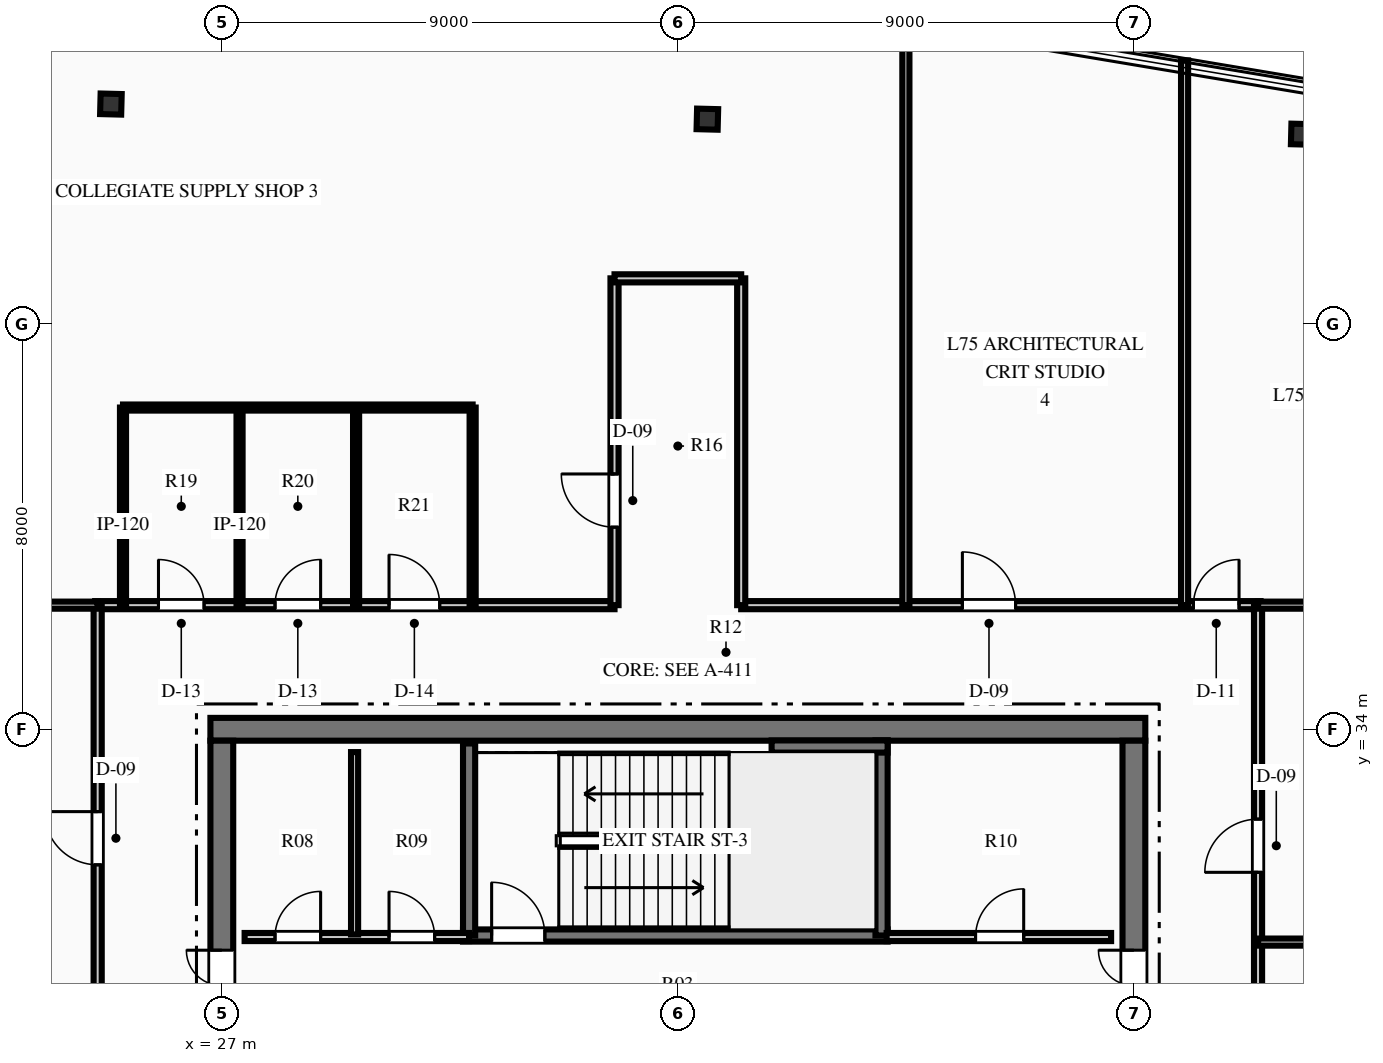
"""IFC4 building model, lengths in metres.
Left out: names, types, materials, properties, quantities, classifications, styles, units other than length and angle.
Written with IfcOpenShell. Run it as: python <this file> out.ifc"""

import sys

from ifc_helpers import new_model, si_unit, direction, frame, frame_2d, origin, origin_2d, place, context, subcontext, project, spatial, rectangle, i_section, extrude, element, fill, save


model = new_model("IFC4")
c1 = context("Model", 3, precision=1e-05, world=origin(), true_north=direction((0.0, 1.0)))
c2 = subcontext(c1, "Body", "Model", "MODEL_VIEW")
j1 = project(units=[si_unit("LENGTHUNIT", "METRE"), si_unit("PLANEANGLEUNIT", "RADIAN")], contexts=[c1])
p1 = place(None, origin())
s1 = spatial("IfcSite", under=j1, at=p1, CompositionType="ELEMENT")
p2 = place(p1, origin())
s2 = spatial("IfcBuilding", under=s1, at=p2, CompositionType="ELEMENT")
p3 = place(p2, frame((0.0, 0.0, 298.2)))
s3 = spatial("IfcBuildingStorey", under=s2, at=p3, CompositionType="ELEMENT", Elevation=298.2)
p4 = place(p3, frame((26.775, 34.0, 0.0), z_axis=(0.0, 0.0, 1.0), x_axis=(1.0, 0.0, 0.0)))
e1 = element("IfcWall", 1, at=p4, inside=s3, PredefinedType="SHEAR", context=c2, shape_type="SweptSolid", body=[
    extrude(rectangle(XDim=18.45, YDim=0.45, at=frame_2d((9.225, 0.0))), origin(), (0.0, 0.0, 1.0), 4.5),
])
p5 = place(p3, frame((27.0, 18.225, 0.0), z_axis=(0.0, 0.0, 1.0), x_axis=(0.0, 1.0, 0.0)))
e2 = element("IfcWall", 2, at=p5, inside=s3, PredefinedType="SHEAR", context=c2, shape_type="SweptSolid", body=[
    extrude(rectangle(XDim=15.55, YDim=0.45, at=frame_2d((7.775, 0.0))), origin(), (0.0, 0.0, 1.0), 4.5),
])
p6 = place(p5, frame((10.015, 0.0, 0.0)))
e3 = element("IfcOpeningElement", 3, at=p6, cuts=e2, PredefinedType="OPENING", context=c2, shape_type="SweptSolid", body=[
    extrude(rectangle(XDim=1.4, YDim=2.2, at=frame_2d((0.7, 1.1))), frame((0.0, 0.235, 0.0), z_axis=(0.0, -1.0, 0.0), x_axis=(1.0, 0.0, 0.0)), (0.0, 0.0, 1.0), 0.47),
])
p7 = place(p3, frame((45.0, 18.225, 0.0), z_axis=(0.0, 0.0, 1.0), x_axis=(0.0, 1.0, 0.0)))
e4 = element("IfcWall", 4, at=p7, inside=s3, PredefinedType="SHEAR", context=c2, shape_type="SweptSolid", body=[
    extrude(rectangle(XDim=15.55, YDim=0.45, at=frame_2d((7.775, 0.0))), origin(), (0.0, 0.0, 1.0), 4.5),
])
p8 = place(p7, frame((10.015, 0.0, 0.0)))
e5 = element("IfcOpeningElement", 5, at=p8, cuts=e4, PredefinedType="OPENING", context=c2, shape_type="SweptSolid", body=[
    extrude(rectangle(XDim=1.4, YDim=2.2, at=frame_2d((0.7, 1.1))), frame((0.0, 0.235, 0.0), z_axis=(0.0, -1.0, 0.0), x_axis=(1.0, 0.0, 0.0)), (0.0, 0.0, 1.0), 0.47),
])
p9 = place(p3, frame((31.76, 29.93, 0.0), z_axis=(0.0, 0.0, 1.0), x_axis=(1.0, 0.0, 0.0)))
e6 = element("IfcWall", 6, at=p9, inside=s3, PredefinedType="SHEAR", context=c2, shape_type="SweptSolid", body=[
    extrude(rectangle(XDim=8.38, YDim=0.24, at=frame_2d((4.19, 0.0))), origin(), (0.0, 0.0, 1.0), 4.5),
])
p10 = place(p9, frame((0.565, 0.0, 0.0)))
e7 = element("IfcOpeningElement", 7, at=p10, cuts=e6, PredefinedType="OPENING", context=c2, shape_type="SweptSolid", body=[
    extrude(rectangle(XDim=1.05, YDim=2.15, at=frame_2d((0.525, 1.075))), frame((0.0, 0.13, 0.0), z_axis=(0.0, -1.0, 0.0), x_axis=(1.0, 0.0, 0.0)), (0.0, 0.0, 1.0), 0.26),
])
p11 = place(p3, frame((31.88, 29.93, 0.0), z_axis=(0.0, 0.0, 1.0), x_axis=(0.0, 1.0, 0.0)))
e8 = element("IfcWall", 8, at=p11, inside=s3, PredefinedType="SHEAR", context=c2, shape_type="SweptSolid", body=[
    extrude(rectangle(XDim=3.79, YDim=0.24, at=frame_2d((1.895, 0.0))), origin(), (0.0, 0.0, 1.0), 4.5),
])
p12 = place(p3, frame((40.02, 29.93, 0.0), z_axis=(0.0, 0.0, 1.0), x_axis=(0.0, 1.0, 0.0)))
e9 = element("IfcWall", 9, at=p12, inside=s3, PredefinedType="SHEAR", context=c2, shape_type="SweptSolid", body=[
    extrude(rectangle(XDim=3.85, YDim=0.24, at=frame_2d((1.925, 0.0))), origin(), (0.0, 0.0, 1.0), 4.5),
])
p13 = place(p3, frame((37.85, 33.66, 0.0), z_axis=(0.0, 0.0, 1.0), x_axis=(1.0, 0.0, 0.0)))
e10 = element("IfcWall", 10, at=p13, inside=s3, PredefinedType="SHEAR", context=c2, shape_type="SweptSolid", body=[
    extrude(rectangle(XDim=2.29, YDim=0.24, at=frame_2d((1.145, 0.0))), origin(), (0.0, 0.0, 1.0), 4.5),
])
for number, where, z_axis, x_axis in (
    (11, (48.312, 45.745, 0.0), (0.0, 0.0, 1.0), (0.025, 1.0, 0.0)),
    (12, (36.582, 46.042, 0.0), (0.0, 0.0, 1.0), (0.025, 1.0, 0.0)),
    (13, (24.811, 46.34, 0.0), (0.0, 0.0, 1.0), (0.025, 1.0, 0.0)),
):
    element("IfcColumn", number, at=place(p3, frame(where, z_axis=z_axis, x_axis=x_axis)), inside=s3, PredefinedType="COLUMN", context=c2, shape_type="SweptSolid", body=[
        extrude(i_section(OverallWidth=0.406, OverallDepth=0.416, WebThickness=0.03, FlangeThickness=0.048, at=origin_2d()), origin(), (0.0, 0.0, 1.0), 4.5),
    ])
p14 = place(p3, frame((27.45, 29.9, 0.0), z_axis=(0.0, 0.0, 1.0), x_axis=(1.0, 0.0, 0.0)))
e14 = element("IfcWall", 14, at=p14, inside=s3, PredefinedType="PARTITIONING", context=c2, shape_type="SweptSolid", body=[
    extrude(rectangle(XDim=4.43, YDim=0.16, at=frame_2d((2.215, 0.0))), origin(), (0.0, 0.0, 1.0), 4.24),
])
p15 = place(p14, frame((0.6, 0.0, 0.0)))
e15 = element("IfcOpeningElement", 15, at=p15, cuts=e14, PredefinedType="OPENING", context=c2, shape_type="SweptSolid", body=[
    extrude(rectangle(XDim=0.9, YDim=2.15, at=frame_2d((0.45, 1.075))), frame((0.0, 0.09, 0.0), z_axis=(0.0, -1.0, 0.0), x_axis=(1.0, 0.0, 0.0)), (0.0, 0.0, 1.0), 0.18),
])
p16 = place(p14, frame((2.85, 0.0, 0.0)))
e16 = element("IfcOpeningElement", 16, at=p16, cuts=e14, PredefinedType="OPENING", context=c2, shape_type="SweptSolid", body=[
    extrude(rectangle(XDim=0.9, YDim=2.15, at=frame_2d((0.45, 1.075))), frame((0.0, 0.09, 0.0), z_axis=(0.0, -1.0, 0.0), x_axis=(1.0, 0.0, 0.0)), (0.0, 0.0, 1.0), 0.18),
])
p17 = place(p3, frame((29.62, 29.95, 0.0), z_axis=(0.0, 0.0, 1.0), x_axis=(0.0, 1.0, 0.0)))
e17 = element("IfcWall", 17, at=p17, inside=s3, PredefinedType="PARTITIONING", context=c2, shape_type="SweptSolid", body=[
    extrude(rectangle(XDim=3.6, YDim=0.14, at=frame_2d((1.8, 0.0))), origin(), (0.0, 0.0, 1.0), 4.24),
])
p18 = place(p3, frame((40.12, 29.9, 0.0), z_axis=(0.0, 0.0, 1.0), x_axis=(1.0, 0.0, 0.0)))
e18 = element("IfcWall", 18, at=p18, inside=s3, PredefinedType="PARTITIONING", context=c2, shape_type="SweptSolid", body=[
    extrude(rectangle(XDim=4.43, YDim=0.16, at=frame_2d((2.215, 0.0))), origin(), (0.0, 0.0, 1.0), 4.24),
])
p19 = place(p18, frame((1.755, 0.0, 0.0)))
e19 = element("IfcOpeningElement", 19, at=p19, cuts=e18, PredefinedType="OPENING", context=c2, shape_type="SweptSolid", body=[
    extrude(rectangle(XDim=0.95, YDim=2.15, at=frame_2d((0.475, 1.075))), frame((0.0, 0.09, 0.0), z_axis=(0.0, -1.0, 0.0), x_axis=(1.0, 0.0, 0.0)), (0.0, 0.0, 1.0), 0.18),
])
p20 = place(p3, frame((24.5, 36.45, 0.0), z_axis=(0.0, 0.0, 1.0), x_axis=(1.0, 0.0, 0.0)))
e20 = element("IfcWall", 20, at=p20, inside=s3, PredefinedType="PARTITIONING", context=c2, shape_type="SweptSolid", body=[
    extrude(rectangle(XDim=10.25, YDim=0.16, at=frame_2d((5.125, 0.0))), origin(), (0.0, 0.0, 1.0), 4.24),
])
p21 = place(p20, frame((1.25, 0.0, 0.0)))
e21 = element("IfcOpeningElement", 21, at=p21, cuts=e20, PredefinedType="OPENING", context=c2, shape_type="SweptSolid", body=[
    extrude(rectangle(XDim=0.9, YDim=2.15, at=frame_2d((0.45, 1.075))), frame((0.0, 0.09, 0.0), z_axis=(0.0, -1.0, 0.0), x_axis=(1.0, 0.0, 0.0)), (0.0, 0.0, 1.0), 0.18),
])
p22 = place(p20, frame((3.55, 0.0, 0.0)))
e22 = element("IfcOpeningElement", 22, at=p22, cuts=e20, PredefinedType="OPENING", context=c2, shape_type="SweptSolid", body=[
    extrude(rectangle(XDim=0.9, YDim=2.15, at=frame_2d((0.45, 1.075))), frame((0.0, 0.09, 0.0), z_axis=(0.0, -1.0, 0.0), x_axis=(1.0, 0.0, 0.0)), (0.0, 0.0, 1.0), 0.18),
])
p23 = place(p20, frame((5.8, 0.0, 0.0)))
e23 = element("IfcOpeningElement", 23, at=p23, cuts=e20, PredefinedType="OPENING", context=c2, shape_type="SweptSolid", body=[
    extrude(rectangle(XDim=1.0, YDim=2.15, at=frame_2d((0.5, 1.075))), frame((0.0, 0.09, 0.0), z_axis=(0.0, -1.0, 0.0), x_axis=(1.0, 0.0, 0.0)), (0.0, 0.0, 1.0), 0.18),
])
p24 = place(p3, frame((37.25, 36.45, 0.0), z_axis=(0.0, 0.0, 1.0), x_axis=(1.0, 0.0, 0.0)))
e24 = element("IfcWall", 24, at=p24, inside=s3, PredefinedType="PARTITIONING", context=c2, shape_type="SweptSolid", body=[
    extrude(rectangle(XDim=10.25, YDim=0.16, at=frame_2d((5.125, 0.0))), origin(), (0.0, 0.0, 1.0), 4.24),
])
p25 = place(p24, frame((4.365, 0.0, 0.0)))
e25 = element("IfcOpeningElement", 25, at=p25, cuts=e24, PredefinedType="OPENING", context=c2, shape_type="SweptSolid", body=[
    extrude(rectangle(XDim=1.05, YDim=2.15, at=frame_2d((0.525, 1.075))), frame((0.0, 0.09, 0.0), z_axis=(0.0, -1.0, 0.0), x_axis=(1.0, 0.0, 0.0)), (0.0, 0.0, 1.0), 0.18),
])
p26 = place(p24, frame((8.925, 0.0, 0.0)))
e26 = element("IfcOpeningElement", 26, at=p26, cuts=e24, PredefinedType="OPENING", context=c2, shape_type="SweptSolid", body=[
    extrude(rectangle(XDim=0.9, YDim=2.15, at=frame_2d((0.45, 1.075))), frame((0.0, 0.09, 0.0), z_axis=(0.0, -1.0, 0.0), x_axis=(1.0, 0.0, 0.0)), (0.0, 0.0, 1.0), 0.18),
])
p27 = place(p3, frame((24.55, 27.25, 0.0), z_axis=(0.0, 0.0, 1.0), x_axis=(0.0, 1.0, 0.0)))
e27 = element("IfcWall", 27, at=p27, inside=s3, PredefinedType="PARTITIONING", context=c2, shape_type="SweptSolid", body=[
    extrude(rectangle(XDim=9.2, YDim=0.16, at=frame_2d((4.6, 0.0))), origin(), (0.0, 0.0, 1.0), 4.24),
])
p28 = place(p27, frame((4.075, 0.0, 0.0)))
e28 = element("IfcOpeningElement", 28, at=p28, cuts=e27, PredefinedType="OPENING", context=c2, shape_type="SweptSolid", body=[
    extrude(rectangle(XDim=1.05, YDim=2.15, at=frame_2d((0.525, 1.075))), frame((0.0, 0.09, 0.0), z_axis=(0.0, -1.0, 0.0), x_axis=(1.0, 0.0, 0.0)), (0.0, 0.0, 1.0), 0.18),
])
p29 = place(p3, frame((47.45, 27.25, 0.0), z_axis=(0.0, 0.0, 1.0), x_axis=(0.0, 1.0, 0.0)))
e29 = element("IfcWall", 29, at=p29, inside=s3, PredefinedType="PARTITIONING", context=c2, shape_type="SweptSolid", body=[
    extrude(rectangle(XDim=9.2, YDim=0.16, at=frame_2d((4.6, 0.0))), origin(), (0.0, 0.0, 1.0), 4.24),
])
p30 = place(p29, frame((3.927, 0.0, 0.0)))
e30 = element("IfcOpeningElement", 30, at=p30, cuts=e29, PredefinedType="OPENING", context=c2, shape_type="SweptSolid", body=[
    extrude(rectangle(XDim=1.05, YDim=2.15, at=frame_2d((0.525, 1.075))), frame((0.0, 0.09, 0.0), z_axis=(0.0, -1.0, 0.0), x_axis=(1.0, 0.0, 0.0)), (0.0, 0.0, 1.0), 0.18),
])
p31 = place(p3, frame((34.75, 36.45, 0.0), z_axis=(0.0, 0.0, 1.0), x_axis=(0.0, 1.0, 0.0)))
e31 = element("IfcWall", 31, at=p31, inside=s3, PredefinedType="PARTITIONING", context=c2, shape_type="SweptSolid", body=[
    extrude(rectangle(XDim=6.45, YDim=0.16, at=frame_2d((3.225, 0.0))), origin(), (0.0, 0.0, 1.0), 4.24),
])
p32 = place(p31, frame((1.539, 0.0, 0.0)))
e32 = element("IfcOpeningElement", 32, at=p32, cuts=e31, PredefinedType="OPENING", context=c2, shape_type="SweptSolid", body=[
    extrude(rectangle(XDim=1.05, YDim=2.15, at=frame_2d((0.525, 1.075))), frame((0.0, 0.09, 0.0), z_axis=(0.0, -1.0, 0.0), x_axis=(1.0, 0.0, 0.0)), (0.0, 0.0, 1.0), 0.18),
])
p33 = place(p3, frame((37.25, 36.45, 0.0), z_axis=(0.0, 0.0, 1.0), x_axis=(0.0, 1.0, 0.0)))
e33 = element("IfcWall", 33, at=p33, inside=s3, PredefinedType="PARTITIONING", context=c2, shape_type="SweptSolid", body=[
    extrude(rectangle(XDim=6.45, YDim=0.16, at=frame_2d((3.225, 0.0))), origin(), (0.0, 0.0, 1.0), 4.24),
])
p34 = place(p3, frame((34.75, 42.9, 0.0), z_axis=(0.0, 0.0, 1.0), x_axis=(1.0, 0.0, 0.0)))
e34 = element("IfcWall", 34, at=p34, inside=s3, PredefinedType="PARTITIONING", context=c2, shape_type="SweptSolid", body=[
    extrude(rectangle(XDim=2.5, YDim=0.16, at=frame_2d((1.25, 0.0))), origin(), (0.0, 0.0, 1.0), 4.24),
])
for number, where, z_axis, x_axis in (
    (35, (25.05, 36.45, 0.0), (0.0, 0.0, 1.0), (0.0, 1.0, 0.0)),
    (36, (27.35, 36.45, 0.0), (0.0, 0.0, 1.0), (0.0, 1.0, 0.0)),
    (37, (29.65, 36.45, 0.0), (0.0, 0.0, 1.0), (0.0, 1.0, 0.0)),
    (38, (31.95, 36.45, 0.0), (0.0, 0.0, 1.0), (0.0, 1.0, 0.0)),
):
    element("IfcWall", number, at=place(p3, frame(where, z_axis=z_axis, x_axis=x_axis)), inside=s3, PredefinedType="PARTITIONING", context=c2, shape_type="SweptSolid", body=[
        extrude(rectangle(XDim=3.9, YDim=0.12, at=frame_2d((1.95, 0.0))), origin(), (0.0, 0.0, 1.0), 4.24),
    ])
p35 = place(p3, frame((25.05, 40.35, 0.0), z_axis=(0.0, 0.0, 1.0), x_axis=(1.0, 0.0, 0.0)))
e39 = element("IfcWall", 39, at=p35, inside=s3, PredefinedType="PARTITIONING", context=c2, shape_type="SweptSolid", body=[
    extrude(rectangle(XDim=6.9, YDim=0.12, at=frame_2d((3.45, 0.0))), origin(), (0.0, 0.0, 1.0), 4.24),
])
p36 = place(p3, frame((15.179, 36.45, 0.0), z_axis=(0.0, 0.0, 1.0), x_axis=(1.0, 0.0, 0.0)))
e40 = element("IfcWall", 40, at=p36, inside=s3, PredefinedType="PARTITIONING", context=c2, shape_type="SweptSolid", body=[
    extrude(rectangle(XDim=9.371, YDim=0.14, at=frame_2d((4.686, 0.0))), origin(), (0.0, 0.0, 1.0), 3.618),
])
p37 = place(p3, frame((47.45, 36.45, 0.0), z_axis=(0.0, 0.0, 1.0), x_axis=(1.0, 0.0, 0.0)))
e41 = element("IfcWall", 41, at=p37, inside=s3, PredefinedType="PARTITIONING", context=c2, shape_type="SweptSolid", body=[
    extrude(rectangle(XDim=12.868, YDim=0.14, at=frame_2d((6.434, 0.0))), origin(), (0.0, 0.0, 1.0), 3.829),
])
p38 = place(p3, frame((40.5, 36.45, 0.0), z_axis=(0.0, 0.0, 1.0), x_axis=(0.0, 1.0, 0.0)))
e42 = element("IfcWall", 42, at=p38, inside=s3, PredefinedType="PARTITIONING", context=c2, shape_type="SweptSolid", body=[
    extrude(rectangle(XDim=11.671, YDim=0.14, at=frame_2d((5.835, 0.0))), origin(), (0.0, 0.0, 1.0), 4.24),
])
p39 = place(p3, frame((46.0, 36.45, 0.0), z_axis=(0.0, 0.0, 1.0), x_axis=(0.0, 1.0, 0.0)))
e43 = element("IfcWall", 43, at=p39, inside=s3, PredefinedType="PARTITIONING", context=c2, shape_type="SweptSolid", body=[
    extrude(rectangle(XDim=10.75, YDim=0.14, at=frame_2d((5.375, 0.0))), origin(), (0.0, 0.0, 1.0), 3.618),
])
p40 = place(p3, frame((47.45, 29.8, 0.0), z_axis=(0.0, 0.0, 1.0), x_axis=(1.0, 0.0, 0.0)))
e44 = element("IfcWall", 44, at=p40, inside=s3, PredefinedType="PARTITIONING", context=c2, shape_type="SweptSolid", body=[
    extrude(rectangle(XDim=11.756, YDim=0.14, at=frame_2d((5.878, 0.0))), origin(), (0.0, 0.0, 1.0), 4.24),
])
p41 = place(p15, origin())
e45 = element("IfcDoor", 45, at=p41, inside=s3, OperationType="SINGLE_SWING_RIGHT", PredefinedType="DOOR", context=c2, shape_type="SweptSolid", body=[
    extrude(rectangle(XDim=0.9, YDim=2.15, at=frame_2d((0.45, 1.075))), frame((0.0, 0.025, 0.0), z_axis=(0.0, -1.0, 0.0), x_axis=(1.0, 0.0, 0.0)), (0.0, 0.0, 1.0), 0.05),
])
fill(e15, e45)
p42 = place(p16, origin())
e46 = element("IfcDoor", 46, at=p42, inside=s3, OperationType="SINGLE_SWING_LEFT", PredefinedType="DOOR", context=c2, shape_type="SweptSolid", body=[
    extrude(rectangle(XDim=0.9, YDim=2.15, at=frame_2d((0.45, 1.075))), frame((0.0, 0.025, 0.0), z_axis=(0.0, -1.0, 0.0), x_axis=(1.0, 0.0, 0.0)), (0.0, 0.0, 1.0), 0.05),
])
fill(e16, e46)
p43 = place(p19, origin())
e47 = element("IfcDoor", 47, at=p43, inside=s3, OperationType="SINGLE_SWING_RIGHT", PredefinedType="DOOR", context=c2, shape_type="SweptSolid", body=[
    extrude(rectangle(XDim=0.95, YDim=2.15, at=frame_2d((0.475, 1.075))), frame((0.0, 0.025, 0.0), z_axis=(0.0, -1.0, 0.0), x_axis=(1.0, 0.0, 0.0)), (0.0, 0.0, 1.0), 0.05),
])
fill(e19, e47)
p44 = place(p10, origin())
e48 = element("IfcDoor", 48, at=p44, inside=s3, OperationType="SINGLE_SWING_LEFT", PredefinedType="DOOR", context=c2, shape_type="SweptSolid", body=[
    extrude(rectangle(XDim=1.05, YDim=2.15, at=frame_2d((0.525, 1.075))), frame((0.0, 0.025, 0.0), z_axis=(0.0, -1.0, 0.0), x_axis=(1.0, 0.0, 0.0)), (0.0, 0.0, 1.0), 0.05),
])
fill(e7, e48)
p45 = place(p6, origin())
e49 = element("IfcDoor", 49, at=p45, inside=s3, OperationType="DOUBLE_DOOR_SINGLE_SWING", PredefinedType="DOOR", context=c2, shape_type="SweptSolid", body=[
    extrude(rectangle(XDim=1.4, YDim=2.2, at=frame_2d((0.7, 1.1))), frame((0.0, 0.025, 0.0), z_axis=(0.0, -1.0, 0.0), x_axis=(1.0, 0.0, 0.0)), (0.0, 0.0, 1.0), 0.05),
])
fill(e3, e49)
p46 = place(p8, origin())
e50 = element("IfcDoor", 50, at=p46, inside=s3, OperationType="DOUBLE_DOOR_SINGLE_SWING", PredefinedType="DOOR", context=c2, shape_type="SweptSolid", body=[
    extrude(rectangle(XDim=1.4, YDim=2.2, at=frame_2d((0.7, 1.1))), frame((0.0, 0.025, 0.0), z_axis=(0.0, -1.0, 0.0), x_axis=(1.0, 0.0, 0.0)), (0.0, 0.0, 1.0), 0.05),
])
fill(e5, e50)
p47 = place(p21, origin())
e51 = element("IfcDoor", 51, at=p47, inside=s3, OperationType="SINGLE_SWING_LEFT", PredefinedType="DOOR", context=c2, shape_type="SweptSolid", body=[
    extrude(rectangle(XDim=0.9, YDim=2.15, at=frame_2d((0.45, 1.075))), frame((0.0, 0.025, 0.0), z_axis=(0.0, -1.0, 0.0), x_axis=(1.0, 0.0, 0.0)), (0.0, 0.0, 1.0), 0.05),
])
fill(e21, e51)
p48 = place(p22, origin())
e52 = element("IfcDoor", 52, at=p48, inside=s3, OperationType="SINGLE_SWING_RIGHT", PredefinedType="DOOR", context=c2, shape_type="SweptSolid", body=[
    extrude(rectangle(XDim=0.9, YDim=2.15, at=frame_2d((0.45, 1.075))), frame((0.0, 0.025, 0.0), z_axis=(0.0, -1.0, 0.0), x_axis=(1.0, 0.0, 0.0)), (0.0, 0.0, 1.0), 0.05),
])
fill(e22, e52)
p49 = place(p23, origin())
e53 = element("IfcDoor", 53, at=p49, inside=s3, OperationType="SINGLE_SWING_LEFT", PredefinedType="DOOR", context=c2, shape_type="SweptSolid", body=[
    extrude(rectangle(XDim=1.0, YDim=2.15, at=frame_2d((0.5, 1.075))), frame((0.0, 0.025, 0.0), z_axis=(0.0, -1.0, 0.0), x_axis=(1.0, 0.0, 0.0)), (0.0, 0.0, 1.0), 0.05),
])
fill(e23, e53)
p50 = place(p32, origin())
e54 = element("IfcDoor", 54, at=p50, inside=s3, OperationType="SINGLE_SWING_RIGHT", PredefinedType="DOOR", context=c2, shape_type="SweptSolid", body=[
    extrude(rectangle(XDim=1.05, YDim=2.15, at=frame_2d((0.525, 1.075))), frame((0.0, 0.025, 0.0), z_axis=(0.0, -1.0, 0.0), x_axis=(1.0, 0.0, 0.0)), (0.0, 0.0, 1.0), 0.05),
])
fill(e32, e54)
p51 = place(p25, origin())
e55 = element("IfcDoor", 55, at=p51, inside=s3, OperationType="SINGLE_SWING_LEFT", PredefinedType="DOOR", context=c2, shape_type="SweptSolid", body=[
    extrude(rectangle(XDim=1.05, YDim=2.15, at=frame_2d((0.525, 1.075))), frame((0.0, 0.025, 0.0), z_axis=(0.0, -1.0, 0.0), x_axis=(1.0, 0.0, 0.0)), (0.0, 0.0, 1.0), 0.05),
])
fill(e25, e55)
p52 = place(p26, origin())
e56 = element("IfcDoor", 56, at=p52, inside=s3, OperationType="SINGLE_SWING_RIGHT", PredefinedType="DOOR", context=c2, shape_type="SweptSolid", body=[
    extrude(rectangle(XDim=0.9, YDim=2.15, at=frame_2d((0.45, 1.075))), frame((0.0, 0.025, 0.0), z_axis=(0.0, -1.0, 0.0), x_axis=(1.0, 0.0, 0.0)), (0.0, 0.0, 1.0), 0.05),
])
fill(e26, e56)
p53 = place(p28, origin())
e57 = element("IfcDoor", 57, at=p53, inside=s3, OperationType="SINGLE_SWING_RIGHT", PredefinedType="DOOR", context=c2, shape_type="SweptSolid", body=[
    extrude(rectangle(XDim=1.05, YDim=2.15, at=frame_2d((0.525, 1.075))), frame((0.0, 0.025, 0.0), z_axis=(0.0, -1.0, 0.0), x_axis=(1.0, 0.0, 0.0)), (0.0, 0.0, 1.0), 0.05),
])
fill(e28, e57)
p54 = place(p30, origin())
e58 = element("IfcDoor", 58, at=p54, inside=s3, OperationType="SINGLE_SWING_LEFT", PredefinedType="DOOR", context=c2, shape_type="SweptSolid", body=[
    extrude(rectangle(XDim=1.05, YDim=2.15, at=frame_2d((0.525, 1.075))), frame((0.0, 0.025, 0.0), z_axis=(0.0, -1.0, 0.0), x_axis=(1.0, 0.0, 0.0)), (0.0, 0.0, 1.0), 0.05),
])
fill(e30, e58)
save(model, sys.argv[1])
